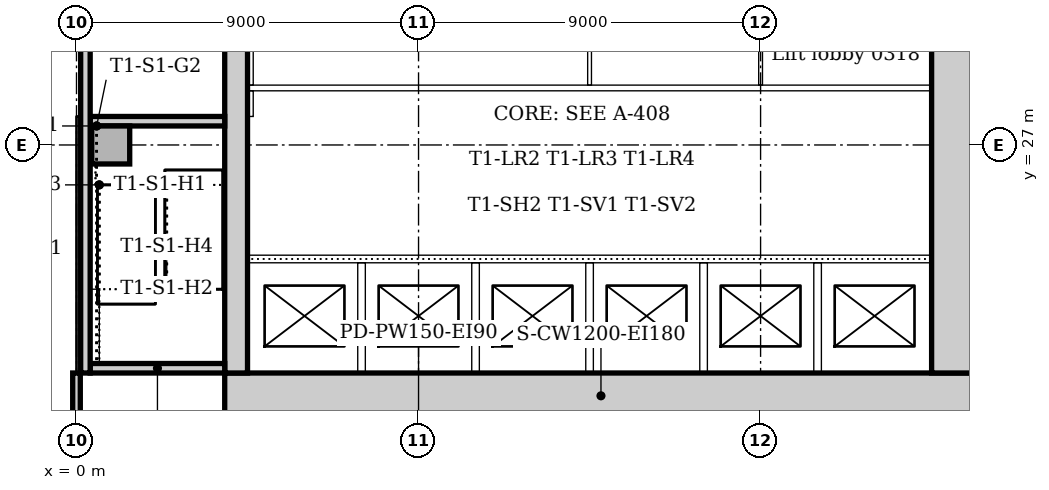
"""IFC4 building model, lengths in metres.
Left out: names, types, materials, properties, quantities, classifications, styles, units other than length and angle.
Written with IfcOpenShell. Run it as: python <this file> out.ifc"""

import sys

from ifc_helpers import new_model, si_unit, direction, frame, frame_2d, origin, origin_2d, place, context, subcontext, project, spatial, rectangle, extrude, element, fill, save


model = new_model("IFC4")
c1 = context("Model", 3, precision=1e-05, world=origin(), true_north=direction((0.0, 1.0)))
c2 = subcontext(c1, "Body", "Model", "MODEL_VIEW")
j1 = project(units=[si_unit("LENGTHUNIT", "METRE"), si_unit("PLANEANGLEUNIT", "RADIAN")], contexts=[c1])
p1 = place(None, origin())
s1 = spatial("IfcSite", under=j1, at=p1, CompositionType="ELEMENT")
p2 = place(p1, origin())
s2 = spatial("IfcBuilding", under=s1, at=p2, CompositionType="ELEMENT")
p3 = place(p2, frame((0.0, 0.0, 16.0)))
s3 = spatial("IfcBuildingStorey", under=s2, at=p3, CompositionType="ELEMENT", Elevation=16.0)
p4 = place(p3, frame((3.9, 20.4, 0.0), z_axis=(0.0, 0.0, 1.0), x_axis=(1.0, 0.0, 0.0)))
e1 = element("IfcWall", 1, at=p4, inside=s3, PredefinedType="SOLIDWALL", context=c2, shape_type="SweptSolid", body=[
    extrude(rectangle(XDim=19.8, YDim=1.2, at=frame_2d((9.9, 0.0))), origin(), (0.0, 0.0, 1.0), 5.0),
])
p5 = place(p3, frame((23.1, 21.0, 0.0), z_axis=(0.0, 0.0, 1.0), x_axis=(0.0, 1.0, 0.0)))
e2 = element("IfcWall", 2, at=p5, inside=s3, PredefinedType="SOLIDWALL", context=c2, shape_type="SweptSolid", body=[
    extrude(rectangle(XDim=10.5, YDim=1.2, at=frame_2d((5.25, 0.0))), origin(), (0.0, 0.0, 1.0), 5.0),
])
p6 = place(p5, frame((4.35, 0.0, 0.0)))
e3 = element("IfcOpeningElement", 3, at=p6, cuts=e2, PredefinedType="OPENING", context=c2, shape_type="SweptSolid", body=[
    extrude(rectangle(XDim=1.8, YDim=2.1, at=frame_2d((0.9, 1.05))), frame((0.0, 0.61, 0.0), z_axis=(0.0, -1.0, 0.0), x_axis=(1.0, 0.0, 0.0)), (0.0, 0.0, 1.0), 1.22),
])
p7 = place(p3, frame((4.2, 31.5, 0.0), z_axis=(0.0, 0.0, 1.0), x_axis=(0.0, -1.0, 0.0)))
e4 = element("IfcWall", 4, at=p7, inside=s3, PredefinedType="SOLIDWALL", context=c2, shape_type="SweptSolid", body=[
    extrude(rectangle(XDim=10.5, YDim=0.6, at=frame_2d((5.25, 0.0))), origin(), (0.0, 0.0, 1.0), 5.0),
])
p8 = place(p7, frame((4.25, 0.0, 0.0)))
e5 = element("IfcOpeningElement", 5, at=p8, cuts=e4, PredefinedType="OPENING", context=c2, shape_type="SweptSolid", body=[
    extrude(rectangle(XDim=1.0, YDim=2.1, at=frame_2d((0.5, 1.05))), frame((0.0, 0.31, 0.0), z_axis=(0.0, -1.0, 0.0), x_axis=(1.0, 0.0, 0.0)), (0.0, 0.0, 1.0), 0.62),
])
p9 = place(p3, frame((0.36, 21.125, 0.0), z_axis=(0.0, 0.0, 1.0), x_axis=(1.0, 0.0, 0.0)))
e6 = element("IfcWall", 6, at=p9, inside=s3, PredefinedType="SOLIDWALL", context=c2, shape_type="SweptSolid", body=[
    extrude(rectangle(XDim=3.54, YDim=0.25, at=frame_2d((1.77, 0.0))), origin(), (0.0, 0.0, 1.0), 5.0),
])
p10 = place(p3, frame((3.9, 27.625, 0.0), z_axis=(0.0, 0.0, 1.0), x_axis=(-1.0, 0.0, 0.0)))
e7 = element("IfcWall", 7, at=p10, inside=s3, PredefinedType="SOLIDWALL", context=c2, shape_type="SweptSolid", body=[
    extrude(rectangle(XDim=3.54, YDim=0.25, at=frame_2d((1.77, 0.0))), origin(), (0.0, 0.0, 1.0), 5.0),
])
p11 = place(p10, frame((0.4, 0.0, 0.0)))
e8 = element("IfcOpeningElement", 8, at=p11, cuts=e7, PredefinedType="OPENING", context=c2, shape_type="SweptSolid", body=[
    extrude(rectangle(XDim=1.0, YDim=2.1, at=frame_2d((0.5, 1.05))), frame((0.0, 0.135, 0.0), z_axis=(0.0, -1.0, 0.0), x_axis=(1.0, 0.0, 0.0)), (0.0, 0.0, 1.0), 0.27),
])
p12 = place(p3, frame((0.235, 21.0, 0.0), z_axis=(0.0, 0.0, 1.0), x_axis=(0.0, 1.0, 0.0)))
e9 = element("IfcWall", 9, at=p12, inside=s3, PredefinedType="SOLIDWALL", context=c2, shape_type="SweptSolid", body=[
    extrude(rectangle(XDim=21.0, YDim=0.25, at=frame_2d((10.5, 0.0))), origin(), (0.0, 0.0, 1.0), 5.0),
])
p13 = place(p3, frame((0.9, 27.0, 0.0), z_axis=(0.0, 0.0, 1.0), x_axis=(1.0, 0.0, 0.0)))
e10 = element("IfcColumn", 10, at=p13, inside=s3, PredefinedType="COLUMN", context=c2, shape_type="SweptSolid", body=[
    extrude(rectangle(XDim=1.0, YDim=1.0, at=origin_2d()), origin(), (0.0, 0.0, 1.0), 5.0),
])
p14 = place(p3, frame((0.0, 3.7, 0.0), z_axis=(0.0, 0.0, 1.0), x_axis=(0.0, 1.0, 0.0)))
e11 = element("IfcWall", 11, at=p14, inside=s3, PredefinedType="PARTITIONING", context=c2, shape_type="SweptSolid", body=[
    extrude(rectangle(XDim=17.3, YDim=0.2, at=frame_2d((8.65, 0.0))), origin(), (0.0, 0.0, 1.0), 4.7),
])
p15 = place(p14, frame((8.1, 0.0, 0.0)))
e12 = element("IfcOpeningElement", 12, at=p15, cuts=e11, PredefinedType="OPENING", context=c2, shape_type="SweptSolid", body=[
    extrude(rectangle(XDim=1.0, YDim=2.1, at=frame_2d((0.5, 1.05))), frame((0.0, 0.11, 0.0), z_axis=(0.0, -1.0, 0.0), x_axis=(1.0, 0.0, 0.0)), (0.0, 0.0, 1.0), 0.22),
])
p16 = place(p3, frame((0.48, 21.25, 0.0), z_axis=(0.0, 0.0, 1.0), x_axis=(0.0, 1.0, 0.0)))
e13 = element("IfcWall", 13, at=p16, inside=s3, PredefinedType="STANDARD", context=c2, shape_type="SweptSolid", body=[
    extrude(rectangle(XDim=1.955, YDim=0.24, at=frame_2d((0.978, 0.0))), origin(), (0.0, 0.0, 1.0), 5.0),
])
p17 = place(p3, frame((4.5, 24.0, 0.0), z_axis=(0.0, 0.0, 1.0), x_axis=(1.0, 0.0, 0.0)))
e14 = element("IfcWall", 14, at=p17, inside=s3, PredefinedType="PARTITIONING", context=c2, shape_type="SweptSolid", body=[
    extrude(rectangle(XDim=18.0, YDim=0.2, at=frame_2d((9.0, 0.0))), origin(), (0.0, 0.0, 1.0), 4.7),
])
p18 = place(p17, frame((0.95, 0.0, 0.0)))
e15 = element("IfcOpeningElement", 15, at=p18, cuts=e14, PredefinedType="OPENING", context=c2, shape_type="SweptSolid", body=[
    extrude(rectangle(XDim=1.1, YDim=2.1, at=frame_2d((0.55, 1.05))), frame((0.0, 0.11, 0.0), z_axis=(0.0, -1.0, 0.0), x_axis=(1.0, 0.0, 0.0)), (0.0, 0.0, 1.0), 0.22),
])
p19 = place(p17, frame((3.95, 0.0, 0.0)))
e16 = element("IfcOpeningElement", 16, at=p19, cuts=e14, PredefinedType="OPENING", context=c2, shape_type="SweptSolid", body=[
    extrude(rectangle(XDim=1.1, YDim=2.1, at=frame_2d((0.55, 1.05))), frame((0.0, 0.11, 0.0), z_axis=(0.0, -1.0, 0.0), x_axis=(1.0, 0.0, 0.0)), (0.0, 0.0, 1.0), 0.22),
])
p20 = place(p17, frame((6.95, 0.0, 0.0)))
e17 = element("IfcOpeningElement", 17, at=p20, cuts=e14, PredefinedType="OPENING", context=c2, shape_type="SweptSolid", body=[
    extrude(rectangle(XDim=1.1, YDim=2.1, at=frame_2d((0.55, 1.05))), frame((0.0, 0.11, 0.0), z_axis=(0.0, -1.0, 0.0), x_axis=(1.0, 0.0, 0.0)), (0.0, 0.0, 1.0), 0.22),
])
p21 = place(p17, frame((9.95, 0.0, 0.0)))
e18 = element("IfcOpeningElement", 18, at=p21, cuts=e14, PredefinedType="OPENING", context=c2, shape_type="SweptSolid", body=[
    extrude(rectangle(XDim=1.1, YDim=2.1, at=frame_2d((0.55, 1.05))), frame((0.0, 0.11, 0.0), z_axis=(0.0, -1.0, 0.0), x_axis=(1.0, 0.0, 0.0)), (0.0, 0.0, 1.0), 0.22),
])
p22 = place(p17, frame((12.95, 0.0, 0.0)))
e19 = element("IfcOpeningElement", 19, at=p22, cuts=e14, PredefinedType="OPENING", context=c2, shape_type="SweptSolid", body=[
    extrude(rectangle(XDim=1.1, YDim=2.1, at=frame_2d((0.55, 1.05))), frame((0.0, 0.11, 0.0), z_axis=(0.0, -1.0, 0.0), x_axis=(1.0, 0.0, 0.0)), (0.0, 0.0, 1.0), 0.22),
])
p23 = place(p17, frame((15.95, 0.0, 0.0)))
e20 = element("IfcOpeningElement", 20, at=p23, cuts=e14, PredefinedType="OPENING", context=c2, shape_type="SweptSolid", body=[
    extrude(rectangle(XDim=1.1, YDim=2.1, at=frame_2d((0.55, 1.05))), frame((0.0, 0.11, 0.0), z_axis=(0.0, -1.0, 0.0), x_axis=(1.0, 0.0, 0.0)), (0.0, 0.0, 1.0), 0.22),
])
for number, where, z_axis, x_axis in (
    (21, (7.5, 21.0, 0.0), (0.0, 0.0, 1.0), (0.0, 1.0, 0.0)),
    (22, (10.5, 21.0, 0.0), (0.0, 0.0, 1.0), (0.0, 1.0, 0.0)),
    (23, (13.5, 21.0, 0.0), (0.0, 0.0, 1.0), (0.0, 1.0, 0.0)),
    (24, (16.5, 21.0, 0.0), (0.0, 0.0, 1.0), (0.0, 1.0, 0.0)),
    (25, (19.5, 21.0, 0.0), (0.0, 0.0, 1.0), (0.0, 1.0, 0.0)),
):
    element("IfcWall", number, at=place(p3, frame(where, z_axis=z_axis, x_axis=x_axis)), inside=s3, PredefinedType="PARTITIONING", context=c2, shape_type="SweptSolid", body=[
        extrude(rectangle(XDim=2.9, YDim=0.2, at=frame_2d((1.45, 0.0))), origin(), (0.0, 0.0, 1.0), 4.7),
    ])
p24 = place(p3, frame((4.5, 28.5, 0.0), z_axis=(0.0, 0.0, 1.0), x_axis=(1.0, 0.0, 0.0)))
e26 = element("IfcWall", 26, at=p24, inside=s3, PredefinedType="PARTITIONING", context=c2, shape_type="SweptSolid", body=[
    extrude(rectangle(XDim=18.0, YDim=0.15, at=frame_2d((9.0, 0.0))), origin(), (0.0, 0.0, 1.0), 4.7),
])
p25 = place(p24, frame((4.1, 0.0, 0.0)))
e27 = element("IfcOpeningElement", 27, at=p25, cuts=e26, PredefinedType="OPENING", context=c2, shape_type="SweptSolid", body=[
    extrude(rectangle(XDim=0.9, YDim=2.1, at=frame_2d((0.45, 1.05))), frame((0.0, 0.085, 0.0), z_axis=(0.0, -1.0, 0.0), x_axis=(1.0, 0.0, 0.0)), (0.0, 0.0, 1.0), 0.17),
])
p26 = place(p24, frame((10.8, 0.0, 0.0)))
e28 = element("IfcOpeningElement", 28, at=p26, cuts=e26, PredefinedType="OPENING", context=c2, shape_type="SweptSolid", body=[
    extrude(rectangle(XDim=0.9, YDim=2.1, at=frame_2d((0.45, 1.05))), frame((0.0, 0.085, 0.0), z_axis=(0.0, -1.0, 0.0), x_axis=(1.0, 0.0, 0.0)), (0.0, 0.0, 1.0), 0.17),
])
p27 = place(p24, frame((15.2, 0.0, 0.0)))
e29 = element("IfcOpeningElement", 29, at=p27, cuts=e26, PredefinedType="OPENING", context=c2, shape_type="SweptSolid", body=[
    extrude(rectangle(XDim=0.9, YDim=2.1, at=frame_2d((0.45, 1.05))), frame((0.0, 0.085, 0.0), z_axis=(0.0, -1.0, 0.0), x_axis=(1.0, 0.0, 0.0)), (0.0, 0.0, 1.0), 0.17),
])
p28 = place(p3, frame((4.575, 27.75, 0.0), z_axis=(0.0, 0.0, 1.0), x_axis=(0.0, 1.0, 0.0)))
e30 = element("IfcWall", 30, at=p28, inside=s3, PredefinedType="PARTITIONING", context=c2, shape_type="SweptSolid", body=[
    extrude(rectangle(XDim=0.675, YDim=0.15, at=frame_2d((0.338, 0.0))), origin(), (0.0, 0.0, 1.0), 4.7),
])
p29 = place(p3, frame((4.575, 28.575, 0.0), z_axis=(0.0, 0.0, 1.0), x_axis=(0.0, 1.0, 0.0)))
e31 = element("IfcWall", 31, at=p29, inside=s3, PredefinedType="PARTITIONING", context=c2, shape_type="SweptSolid", body=[
    extrude(rectangle(XDim=2.675, YDim=0.15, at=frame_2d((1.337, 0.0))), origin(), (0.0, 0.0, 1.0), 4.7),
])
for number, where, z_axis, x_axis in (
    (32, (13.5, 28.575, 0.0), (0.0, 0.0, 1.0), (0.0, 1.0, 0.0)),
    (33, (18.0, 28.575, 0.0), (0.0, 0.0, 1.0), (0.0, 1.0, 0.0)),
):
    element("IfcWall", number, at=place(p3, frame(where, z_axis=z_axis, x_axis=x_axis)), inside=s3, PredefinedType="PARTITIONING", context=c2, shape_type="SweptSolid", body=[
        extrude(rectangle(XDim=2.675, YDim=0.1, at=frame_2d((1.337, 0.0))), origin(), (0.0, 0.0, 1.0), 4.7),
    ])
p30 = place(p8, frame((1.0, 0.0, 0.0), z_axis=(0.0, 0.0, 1.0), x_axis=(-1.0, 0.0, 0.0)))
e34 = element("IfcDoor", 34, at=p30, inside=s3, OperationType="SINGLE_SWING_RIGHT", PredefinedType="DOOR", context=c2, shape_type="SweptSolid", body=[
    extrude(rectangle(XDim=1.0, YDim=2.1, at=frame_2d((0.5, 1.05))), frame((0.0, 0.025, 0.0), z_axis=(0.0, -1.0, 0.0), x_axis=(1.0, 0.0, 0.0)), (0.0, 0.0, 1.0), 0.05),
])
fill(e5, e34)
p31 = place(p11, origin())
e35 = element("IfcDoor", 35, at=p31, inside=s3, OperationType="SINGLE_SWING_LEFT", PredefinedType="DOOR", context=c2, shape_type="SweptSolid", body=[
    extrude(rectangle(XDim=1.0, YDim=2.1, at=frame_2d((0.5, 1.05))), frame((0.0, 0.025, 0.0), z_axis=(0.0, -1.0, 0.0), x_axis=(1.0, 0.0, 0.0)), (0.0, 0.0, 1.0), 0.05),
])
fill(e8, e35)
p32 = place(p18, origin())
e36 = element("IfcDoor", 36, at=p32, inside=s3, OperationType="SLIDING_TO_LEFT", PredefinedType="DOOR", context=c2, shape_type="SweptSolid", body=[
    extrude(rectangle(XDim=1.1, YDim=2.1, at=frame_2d((0.55, 1.05))), frame((0.0, 0.025, 0.0), z_axis=(0.0, -1.0, 0.0), x_axis=(1.0, 0.0, 0.0)), (0.0, 0.0, 1.0), 0.05),
])
fill(e15, e36)
p33 = place(p19, origin())
e37 = element("IfcDoor", 37, at=p33, inside=s3, OperationType="SLIDING_TO_LEFT", PredefinedType="DOOR", context=c2, shape_type="SweptSolid", body=[
    extrude(rectangle(XDim=1.1, YDim=2.1, at=frame_2d((0.55, 1.05))), frame((0.0, 0.025, 0.0), z_axis=(0.0, -1.0, 0.0), x_axis=(1.0, 0.0, 0.0)), (0.0, 0.0, 1.0), 0.05),
])
fill(e16, e37)
p34 = place(p20, origin())
e38 = element("IfcDoor", 38, at=p34, inside=s3, OperationType="SLIDING_TO_LEFT", PredefinedType="DOOR", context=c2, shape_type="SweptSolid", body=[
    extrude(rectangle(XDim=1.1, YDim=2.1, at=frame_2d((0.55, 1.05))), frame((0.0, 0.025, 0.0), z_axis=(0.0, -1.0, 0.0), x_axis=(1.0, 0.0, 0.0)), (0.0, 0.0, 1.0), 0.05),
])
fill(e17, e38)
p35 = place(p21, origin())
e39 = element("IfcDoor", 39, at=p35, inside=s3, OperationType="SLIDING_TO_LEFT", PredefinedType="DOOR", context=c2, shape_type="SweptSolid", body=[
    extrude(rectangle(XDim=1.1, YDim=2.1, at=frame_2d((0.55, 1.05))), frame((0.0, 0.025, 0.0), z_axis=(0.0, -1.0, 0.0), x_axis=(1.0, 0.0, 0.0)), (0.0, 0.0, 1.0), 0.05),
])
fill(e18, e39)
p36 = place(p22, origin())
e40 = element("IfcDoor", 40, at=p36, inside=s3, OperationType="SLIDING_TO_LEFT", PredefinedType="DOOR", context=c2, shape_type="SweptSolid", body=[
    extrude(rectangle(XDim=1.1, YDim=2.1, at=frame_2d((0.55, 1.05))), frame((0.0, 0.025, 0.0), z_axis=(0.0, -1.0, 0.0), x_axis=(1.0, 0.0, 0.0)), (0.0, 0.0, 1.0), 0.05),
])
fill(e19, e40)
p37 = place(p23, origin())
e41 = element("IfcDoor", 41, at=p37, inside=s3, OperationType="SLIDING_TO_LEFT", PredefinedType="DOOR", context=c2, shape_type="SweptSolid", body=[
    extrude(rectangle(XDim=1.1, YDim=2.1, at=frame_2d((0.55, 1.05))), frame((0.0, 0.025, 0.0), z_axis=(0.0, -1.0, 0.0), x_axis=(1.0, 0.0, 0.0)), (0.0, 0.0, 1.0), 0.05),
])
fill(e20, e41)
p38 = place(p6, origin())
e42 = element("IfcDoor", 42, at=p38, inside=s3, OperationType="DOUBLE_DOOR_DOUBLE_SWING", PredefinedType="DOOR", context=c2, shape_type="SweptSolid", body=[
    extrude(rectangle(XDim=1.8, YDim=2.1, at=frame_2d((0.9, 1.05))), frame((0.0, 0.025, 0.0), z_axis=(0.0, -1.0, 0.0), x_axis=(1.0, 0.0, 0.0)), (0.0, 0.0, 1.0), 0.05),
])
fill(e3, e42)
p39 = place(p25, origin())
e43 = element("IfcDoor", 43, at=p39, inside=s3, OperationType="SINGLE_SWING_RIGHT", PredefinedType="DOOR", context=c2, shape_type="SweptSolid", body=[
    extrude(rectangle(XDim=0.9, YDim=2.1, at=frame_2d((0.45, 1.05))), frame((0.0, 0.025, 0.0), z_axis=(0.0, -1.0, 0.0), x_axis=(1.0, 0.0, 0.0)), (0.0, 0.0, 1.0), 0.05),
])
fill(e27, e43)
p40 = place(p26, origin())
e44 = element("IfcDoor", 44, at=p40, inside=s3, OperationType="SINGLE_SWING_LEFT", PredefinedType="DOOR", context=c2, shape_type="SweptSolid", body=[
    extrude(rectangle(XDim=0.9, YDim=2.1, at=frame_2d((0.45, 1.05))), frame((0.0, 0.025, 0.0), z_axis=(0.0, -1.0, 0.0), x_axis=(1.0, 0.0, 0.0)), (0.0, 0.0, 1.0), 0.05),
])
fill(e28, e44)
p41 = place(p27, origin())
e45 = element("IfcDoor", 45, at=p41, inside=s3, OperationType="SINGLE_SWING_RIGHT", PredefinedType="DOOR", context=c2, shape_type="SweptSolid", body=[
    extrude(rectangle(XDim=0.9, YDim=2.1, at=frame_2d((0.45, 1.05))), frame((0.0, 0.025, 0.0), z_axis=(0.0, -1.0, 0.0), x_axis=(1.0, 0.0, 0.0)), (0.0, 0.0, 1.0), 0.05),
])
fill(e29, e45)
save(model, sys.argv[1])
